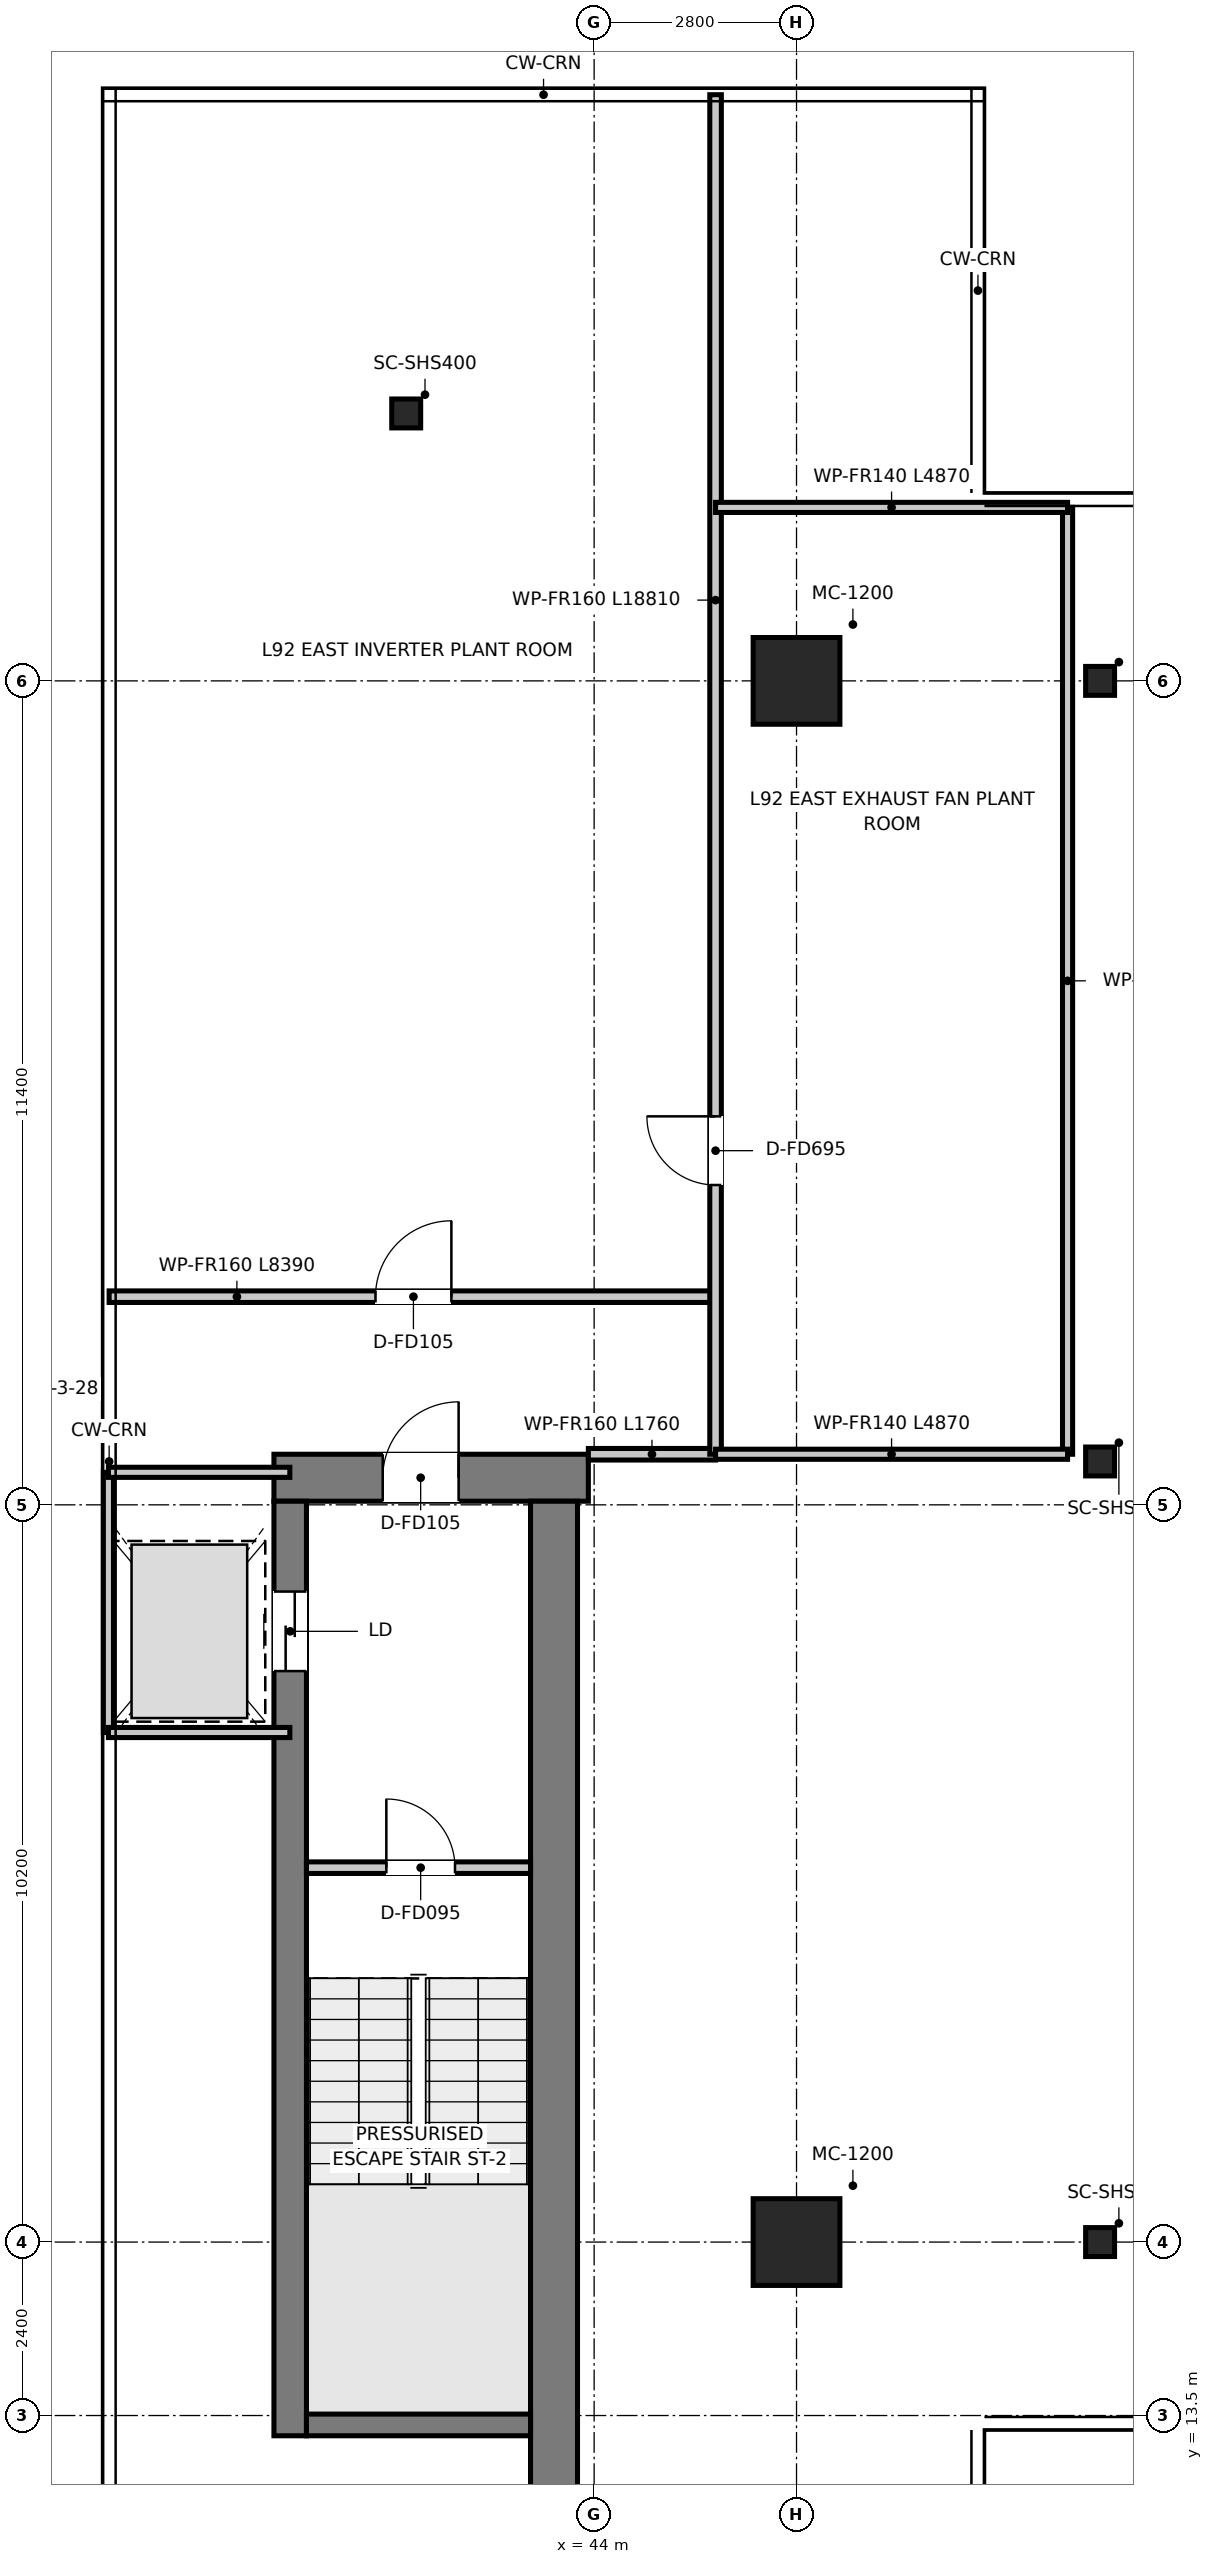
"""IFC4 building model, lengths in metres.
Left out: names, types, materials, properties, quantities, classifications, styles, units other than length and angle.
Written with IfcOpenShell. Run it as: python <this file> out.ifc"""

import sys

from ifc_helpers import new_model, si_unit, direction, frame, frame_2d, origin, origin_2d, place, context, subcontext, project, spatial, rectangle, hollow_rectangle, extrude, source, transform, mapped, element, fill, save


model = new_model("IFC4")
c1 = context("Model", 3, precision=1e-05, world=origin(), true_north=direction((0.0, 1.0)))
c2 = subcontext(c1, "Body", "Model", "MODEL_VIEW")
j1 = project(units=[si_unit("LENGTHUNIT", "METRE"), si_unit("PLANEANGLEUNIT", "RADIAN")], contexts=[c1])
p1 = place(None, origin())
s1 = spatial("IfcSite", under=j1, at=p1, CompositionType="ELEMENT")
p2 = place(p1, origin())
s2 = spatial("IfcBuilding", under=s1, at=p2, CompositionType="ELEMENT")
p3 = place(p2, frame((0.0, 0.0, 374.65)))
s3 = spatial("IfcBuildingStorey", under=s2, at=p3, CompositionType="ELEMENT", Elevation=374.65)
p4 = place(p3, frame((39.57, 26.475, 0.0), z_axis=(0.0, 0.0, 1.0), x_axis=(1.0, 0.0, 0.0)))
e1 = element("IfcWall", 1, at=p4, inside=s3, PredefinedType="SHEAR", context=c2, shape_type="SweptSolid", body=[
    extrude(rectangle(XDim=4.35, YDim=0.65, at=frame_2d((2.175, 0.0))), origin(), (0.0, 0.0, 1.0), 3.6),
])
p5 = place(p4, frame((1.505, 0.0, 0.0)))
e2 = element("IfcOpeningElement", 2, at=p5, cuts=e1, PredefinedType="OPENING", context=c2, shape_type="SweptSolid", body=[
    extrude(rectangle(XDim=1.05, YDim=2.1, at=frame_2d((0.525, 1.05))), frame((0.0, 0.335, 0.0), z_axis=(0.0, -1.0, 0.0), x_axis=(1.0, 0.0, 0.0)), (0.0, 0.0, 1.0), 0.67),
])
p6 = place(p3, frame((39.795, 13.22, 0.0), z_axis=(0.0, 0.0, 1.0), x_axis=(0.0, 1.0, 0.0)))
e3 = element("IfcWall", 3, at=p6, inside=s3, PredefinedType="SHEAR", context=c2, shape_type="SweptSolid", body=[
    extrude(rectangle(XDim=12.93, YDim=0.45, at=frame_2d((6.465, 0.0))), origin(), (0.0, 0.0, 1.0), 3.6),
])
p7 = place(p6, frame((10.58, 0.0, 0.0)))
e4 = element("IfcOpeningElement", 4, at=p7, cuts=e3, PredefinedType="OPENING", context=c2, shape_type="SweptSolid", body=[
    extrude(rectangle(XDim=1.1, YDim=2.15, at=frame_2d((0.55, 1.075))), frame((0.0, 0.235, 0.0), z_axis=(0.0, -1.0, 0.0), x_axis=(1.0, 0.0, 0.0)), (0.0, 0.0, 1.0), 0.47),
])
p8 = place(p3, frame((43.445, 11.15, 0.0), z_axis=(0.0, 0.0, 1.0), x_axis=(0.0, 1.0, 0.0)))
e5 = element("IfcWall", 5, at=p8, inside=s3, PredefinedType="SHEAR", context=c2, shape_type="SweptSolid", body=[
    extrude(rectangle(XDim=15.0, YDim=0.65, at=frame_2d((7.5, 0.0))), origin(), (0.0, 0.0, 1.0), 3.6),
])
p9 = place(p3, frame((40.02, 13.37, 0.0), z_axis=(0.0, 0.0, 1.0), x_axis=(1.0, 0.0, 0.0)))
e6 = element("IfcWall", 6, at=p9, inside=s3, PredefinedType="SHEAR", context=c2, shape_type="SweptSolid", body=[
    extrude(rectangle(XDim=3.1, YDim=0.3, at=frame_2d((1.55, 0.0))), origin(), (0.0, 0.0, 1.0), 3.6),
])
m1 = source(origin(), c2, "Body", "SweptSolid", [
    extrude(rectangle(XDim=1.2, YDim=1.2, at=origin_2d()), origin(), (0.0, 0.0, 1.0), 3.6),
])
for number, where, z_axis, x_axis in (
    (7, (46.8, 15.9, 0.0), (0.0, 0.0, 1.0), (1.0, 0.0, 0.0)),
    (8, (46.8, 37.5, 0.0), (0.0, 0.0, 1.0), (1.0, 0.0, 0.0)),
):
    element("IfcColumn", number, at=place(p3, frame(where, z_axis=z_axis, x_axis=x_axis)), inside=s3, PredefinedType="USERDEFINED", context=c2, shape_type="MappedRepresentation", body=[
        mapped(m1, transform((0.0, 0.0, 0.0), x_axis=(1.0, 0.0, 0.0), y_axis=(0.0, 1.0, 0.0), z_axis=(0.0, 0.0, 1.0), scale=1.0)),
    ])
m2 = source(origin(), c2, "Body", "SweptSolid", [
    extrude(hollow_rectangle(XDim=0.4, YDim=0.4, WallThickness=0.025, at=origin_2d()), origin(), (0.0, 0.0, 1.0), 3.6),
])
for number, where, z_axis, x_axis in (
    (9, (51.0, 15.9, 0.0), (0.0, 0.0, 1.0), (1.0, 0.0, 0.0)),
    (10, (51.0, 26.7, 0.0), (0.0, 0.0, 1.0), (1.0, 0.0, 0.0)),
    (11, (51.0, 37.5, 0.0), (0.0, 0.0, 1.0), (1.0, 0.0, 0.0)),
    (12, (41.4, 41.2, 0.0), (0.0, 0.0, 1.0), (1.0, 0.0, 0.0)),
):
    element("IfcColumn", number, at=place(p3, frame(where, z_axis=z_axis, x_axis=x_axis)), inside=s3, PredefinedType="COLUMN", context=c2, shape_type="MappedRepresentation", body=[
        mapped(m2, transform((0.0, 0.0, 0.0), x_axis=(1.0, 0.0, 0.0), y_axis=(0.0, 1.0, 0.0), z_axis=(0.0, 0.0, 1.0), scale=1.0)),
    ])
p10 = place(p3, frame((40.02, 21.08, 0.0), z_axis=(0.0, 0.0, 1.0), x_axis=(1.0, 0.0, 0.0)))
e13 = element("IfcWall", 13, at=p10, inside=s3, PredefinedType="PARTITIONING", context=c2, shape_type="SweptSolid", body=[
    extrude(rectangle(XDim=3.1, YDim=0.16, at=frame_2d((1.55, 0.0))), origin(), (0.0, 0.0, 1.0), 3.3),
])
p11 = place(p10, frame((1.105, 0.0, 0.0)))
e14 = element("IfcOpeningElement", 14, at=p11, cuts=e13, PredefinedType="OPENING", context=c2, shape_type="SweptSolid", body=[
    extrude(rectangle(XDim=0.95, YDim=2.1, at=frame_2d((0.475, 1.05))), frame((0.0, 0.09, 0.0), z_axis=(0.0, -1.0, 0.0), x_axis=(1.0, 0.0, 0.0)), (0.0, 0.0, 1.0), 0.18),
])
p12 = place(p3, frame((37.28, 22.95, 0.0), z_axis=(0.0, 0.0, 1.0), x_axis=(0.0, 1.0, 0.0)))
e15 = element("IfcWall", 15, at=p12, inside=s3, PredefinedType="PARTITIONING", context=c2, shape_type="SweptSolid", body=[
    extrude(rectangle(XDim=3.6, YDim=0.14, at=frame_2d((1.8, 0.0))), origin(), (0.0, 0.0, 1.0), 3.3),
])
for number, where, z_axis, x_axis in (
    (16, (37.28, 22.95, 0.0), (0.0, 0.0, 1.0), (1.0, 0.0, 0.0)),
    (17, (37.28, 26.55, 0.0), (0.0, 0.0, 1.0), (1.0, 0.0, 0.0)),
):
    element("IfcWall", number, at=place(p3, frame(where, z_axis=z_axis, x_axis=x_axis)), inside=s3, PredefinedType="PARTITIONING", context=c2, shape_type="SweptSolid", body=[
        extrude(rectangle(XDim=2.51, YDim=0.14, at=frame_2d((1.255, 0.0))), origin(), (0.0, 0.0, 1.0), 3.3),
    ])
p13 = place(p3, frame((37.29, 28.98, 0.0), z_axis=(0.0, 0.0, 1.0), x_axis=(1.0, 0.0, 0.0)))
e18 = element("IfcWall", 18, at=p13, inside=s3, PredefinedType="PARTITIONING", context=c2, shape_type="SweptSolid", body=[
    extrude(rectangle(XDim=8.39, YDim=0.16, at=frame_2d((4.195, 0.0))), origin(), (0.0, 0.0, 1.0), 2.81),
])
p14 = place(p13, frame((3.685, 0.0, 0.0)))
e19 = element("IfcOpeningElement", 19, at=p14, cuts=e18, PredefinedType="OPENING", context=c2, shape_type="SweptSolid", body=[
    extrude(rectangle(XDim=1.05, YDim=2.1, at=frame_2d((0.525, 1.05))), frame((0.0, 0.09, 0.0), z_axis=(0.0, -1.0, 0.0), x_axis=(1.0, 0.0, 0.0)), (0.0, 0.0, 1.0), 0.18),
])
p15 = place(p3, frame((43.92, 26.8, 0.0), z_axis=(0.0, 0.0, 1.0), x_axis=(1.0, 0.0, 0.0)))
e20 = element("IfcWall", 20, at=p15, inside=s3, PredefinedType="PARTITIONING", context=c2, shape_type="SweptSolid", body=[
    extrude(rectangle(XDim=1.76, YDim=0.16, at=frame_2d((0.88, 0.0))), origin(), (0.0, 0.0, 1.0), 3.3),
])
p16 = place(p3, frame((45.68, 26.8, 0.0), z_axis=(0.0, 0.0, 1.0), x_axis=(0.0, 1.0, 0.0)))
e21 = element("IfcWall", 21, at=p16, inside=s3, PredefinedType="PARTITIONING", context=c2, shape_type="SweptSolid", body=[
    extrude(rectangle(XDim=18.81, YDim=0.16, at=frame_2d((9.405, 0.0))), origin(), (0.0, 0.0, 1.0), 2.81),
])
p17 = place(p16, frame((3.725, 0.0, 0.0)))
e22 = element("IfcOpeningElement", 22, at=p17, cuts=e21, PredefinedType="OPENING", context=c2, shape_type="SweptSolid", body=[
    extrude(rectangle(XDim=0.95, YDim=2.1, at=frame_2d((0.475, 1.05))), frame((0.0, 0.09, 0.0), z_axis=(0.0, -1.0, 0.0), x_axis=(1.0, 0.0, 0.0)), (0.0, 0.0, 1.0), 0.18),
])
p18 = place(p3, frame((50.55, 26.8, 0.0), z_axis=(0.0, 0.0, 1.0), x_axis=(0.0, 1.0, 0.0)))
e23 = element("IfcWall", 23, at=p18, inside=s3, PredefinedType="PARTITIONING", context=c2, shape_type="SweptSolid", body=[
    extrude(rectangle(XDim=13.1, YDim=0.14, at=frame_2d((6.55, 0.0))), origin(), (0.0, 0.0, 1.0), 2.81),
])
p19 = place(p3, frame((45.68, 26.8, 0.0), z_axis=(0.0, 0.0, 1.0), x_axis=(1.0, 0.0, 0.0)))
e24 = element("IfcWall", 24, at=p19, inside=s3, PredefinedType="PARTITIONING", context=c2, shape_type="SweptSolid", body=[
    extrude(rectangle(XDim=4.87, YDim=0.14, at=frame_2d((2.435, 0.0))), origin(), (0.0, 0.0, 1.0), 2.81),
])
p20 = place(p3, frame((45.68, 39.9, 0.0), z_axis=(0.0, 0.0, 1.0), x_axis=(1.0, 0.0, 0.0)))
e25 = element("IfcWall", 25, at=p20, inside=s3, PredefinedType="PARTITIONING", context=c2, shape_type="SweptSolid", body=[
    extrude(rectangle(XDim=4.87, YDim=0.14, at=frame_2d((2.435, 0.0))), origin(), (0.0, 0.0, 1.0), 3.3),
])
p21 = place(p11, origin())
e26 = element("IfcDoor", 26, at=p21, inside=s3, OperationType="SINGLE_SWING_LEFT", PredefinedType="DOOR", context=c2, shape_type="SweptSolid", body=[
    extrude(rectangle(XDim=0.95, YDim=2.1, at=frame_2d((0.475, 1.05))), frame((0.0, 0.025, 0.0), z_axis=(0.0, -1.0, 0.0), x_axis=(1.0, 0.0, 0.0)), (0.0, 0.0, 1.0), 0.05),
])
fill(e14, e26)
p22 = place(p7, origin())
e27 = element("IfcDoor", 27, at=p22, inside=s3, OperationType="DOUBLE_DOOR_SLIDING", PredefinedType="DOOR", context=c2, shape_type="SweptSolid", body=[
    extrude(rectangle(XDim=1.1, YDim=2.15, at=frame_2d((0.55, 1.075))), frame((0.0, 0.025, 0.0), z_axis=(0.0, -1.0, 0.0), x_axis=(1.0, 0.0, 0.0)), (0.0, 0.0, 1.0), 0.05),
])
fill(e4, e27)
p23 = place(p5, origin())
e28 = element("IfcDoor", 28, at=p23, inside=s3, OperationType="SINGLE_SWING_RIGHT", PredefinedType="DOOR", context=c2, shape_type="SweptSolid", body=[
    extrude(rectangle(XDim=1.05, YDim=2.1, at=frame_2d((0.525, 1.05))), frame((0.0, 0.025, 0.0), z_axis=(0.0, -1.0, 0.0), x_axis=(1.0, 0.0, 0.0)), (0.0, 0.0, 1.0), 0.05),
])
fill(e2, e28)
p24 = place(p14, origin())
e29 = element("IfcDoor", 29, at=p24, inside=s3, OperationType="SINGLE_SWING_RIGHT", PredefinedType="DOOR", context=c2, shape_type="SweptSolid", body=[
    extrude(rectangle(XDim=1.05, YDim=2.1, at=frame_2d((0.525, 1.05))), frame((0.0, 0.025, 0.0), z_axis=(0.0, -1.0, 0.0), x_axis=(1.0, 0.0, 0.0)), (0.0, 0.0, 1.0), 0.05),
])
fill(e19, e29)
p25 = place(p17, origin())
e30 = element("IfcDoor", 30, at=p25, inside=s3, OperationType="SINGLE_SWING_RIGHT", PredefinedType="DOOR", context=c2, shape_type="SweptSolid", body=[
    extrude(rectangle(XDim=0.95, YDim=2.1, at=frame_2d((0.475, 1.05))), frame((0.0, 0.025, 0.0), z_axis=(0.0, -1.0, 0.0), x_axis=(1.0, 0.0, 0.0)), (0.0, 0.0, 1.0), 0.05),
])
fill(e22, e30)
save(model, sys.argv[1])
